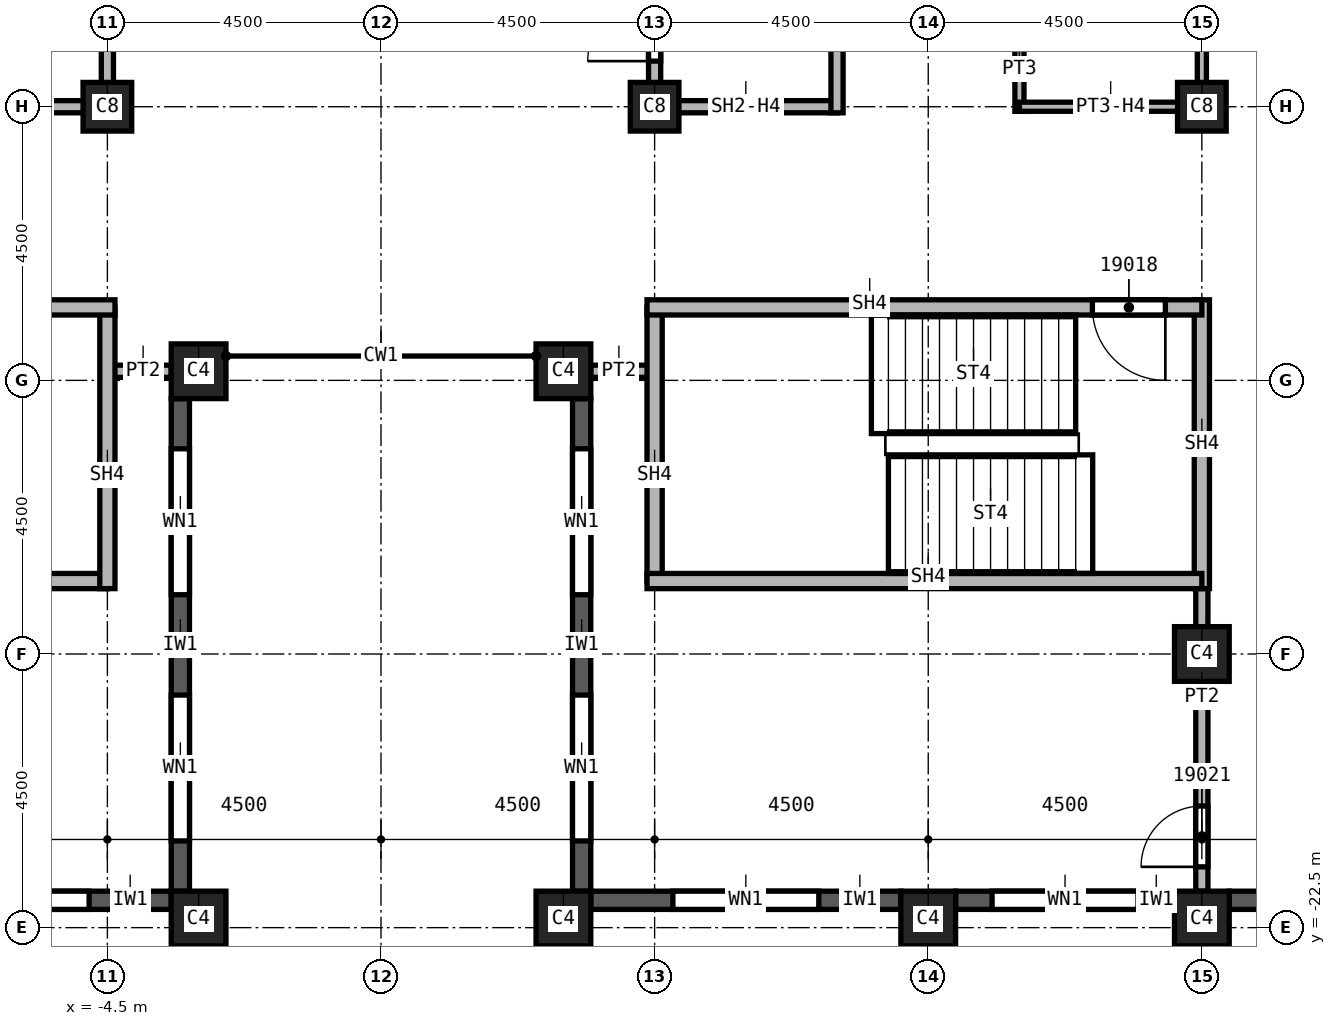
"""IFC4 building model, lengths in metres.
Left out: names, types, materials, properties, quantities, classifications, styles, units other than length and angle.
Written with IfcOpenShell. Run it as: python <this file> out.ifc"""

import sys

from ifc_helpers import new_model, si_unit, direction, frame, frame_2d, origin, origin_2d, place, context, subcontext, project, spatial, rectangle, extrude, element, fill, save


model = new_model("IFC4")
c1 = context("Model", 3, precision=1e-05, world=origin(), true_north=direction((0.0, 1.0)))
c2 = subcontext(c1, "Body", "Model", "MODEL_VIEW")
j1 = project(units=[si_unit("LENGTHUNIT", "METRE"), si_unit("PLANEANGLEUNIT", "RADIAN")], contexts=[c1])
p1 = place(None, origin())
s1 = spatial("IfcSite", under=j1, at=p1, CompositionType="ELEMENT")
p2 = place(p1, origin())
s2 = spatial("IfcBuilding", under=s1, at=p2, CompositionType="ELEMENT")
p3 = place(p2, frame((0.0, 0.0, 278.0)))
s3 = spatial("IfcBuildingStorey", under=s2, at=p3, CompositionType="ELEMENT", Elevation=278.0)
p4 = place(p3, frame((13.5, -18.0, 0.0), z_axis=(0.0, 0.0, 1.0), x_axis=(1.0, 0.0, 0.0)))
e1 = element("IfcColumn", 1, at=p4, inside=s3, PredefinedType="COLUMN", context=c2, shape_type="SweptSolid", body=[
    extrude(rectangle(XDim=0.9, YDim=0.9, at=origin_2d()), origin(), (0.0, 0.0, 1.0), 3.72),
])
for number, where, z_axis, x_axis in (
    (2, (4.5, -9.0, 0.0), (0.0, 0.0, 1.0), (1.0, 0.0, 0.0)),
    (3, (13.5, -9.0, 0.0), (0.0, 0.0, 1.0), (1.0, 0.0, 0.0)),
    (4, (-4.5, -9.0, 0.0), (0.0, 0.0, 1.0), (1.0, 0.0, 0.0)),
):
    element("IfcColumn", number, at=place(p3, frame(where, z_axis=z_axis, x_axis=x_axis)), inside=s3, PredefinedType="COLUMN", context=c2, shape_type="SweptSolid", body=[
        extrude(rectangle(XDim=0.8, YDim=0.8, at=origin_2d()), origin(), (0.0, 0.0, 1.0), 3.72),
    ])
for number, where, z_axis, x_axis in (
    (5, (3.0, -22.35, 0.0), (0.0, 0.0, 1.0), (1.0, 0.0, 0.0)),
    (6, (9.0, -22.35, 0.0), (0.0, 0.0, 1.0), (1.0, 0.0, 0.0)),
    (7, (13.5, -22.35, 0.0), (0.0, 0.0, 1.0), (1.0, 0.0, 0.0)),
    (8, (-3.0, -22.35, 0.0), (0.0, 0.0, 1.0), (1.0, 0.0, 0.0)),
    (9, (3.0, -13.35, 0.0), (0.0, 0.0, 1.0), (1.0, 0.0, 0.0)),
    (10, (-3.0, -13.35, 0.0), (0.0, 0.0, 1.0), (1.0, 0.0, 0.0)),
):
    element("IfcColumn", number, at=place(p3, frame(where, z_axis=z_axis, x_axis=x_axis)), inside=s3, PredefinedType="COLUMN", context=c2, shape_type="SweptSolid", body=[
        extrude(rectangle(XDim=0.9, YDim=0.9, at=origin_2d()), origin(), (0.0, 0.0, 1.0), 3.72),
    ])
p5 = place(p3, frame((-8.55, -22.05, 0.0), z_axis=(0.0, 0.0, 1.0), x_axis=(1.0, 0.0, 0.0)))
e11 = element("IfcWall", 11, at=p5, inside=s3, PredefinedType="SOLIDWALL", context=c2, shape_type="SweptSolid", body=[
    extrude(rectangle(XDim=5.1, YDim=0.3, at=frame_2d((2.55, 0.0))), origin(), (0.0, 0.0, 1.0), 3.12),
])
p6 = place(p5, frame((1.35, 0.0, 0.8)))
e12 = element("IfcOpeningElement", 12, at=p6, cuts=e11, PredefinedType="OPENING", context=c2, shape_type="SweptSolid", body=[
    extrude(rectangle(XDim=2.4, YDim=1.95, at=frame_2d((1.2, 0.975))), frame((0.0, 0.15, 0.0), z_axis=(0.0, -1.0, 0.0), x_axis=(1.0, 0.0, 0.0)), (0.0, 0.0, 1.0), 0.3),
])
p7 = place(p3, frame((-3.3, -21.9, 0.0), z_axis=(0.0, 0.0, 1.0), x_axis=(0.0, 1.0, 0.0)))
e13 = element("IfcWall", 13, at=p7, inside=s3, PredefinedType="SOLIDWALL", context=c2, shape_type="SweptSolid", body=[
    extrude(rectangle(XDim=8.1, YDim=0.3, at=frame_2d((4.05, 0.0))), origin(), (0.0, 0.0, 1.0), 3.12),
])
p8 = place(p7, frame((0.825, 0.0, 0.8)))
e14 = element("IfcOpeningElement", 14, at=p8, cuts=e13, PredefinedType="OPENING", context=c2, shape_type="SweptSolid", body=[
    extrude(rectangle(XDim=2.4, YDim=1.95, at=frame_2d((1.2, 0.975))), frame((0.0, 0.15, 0.0), z_axis=(0.0, -1.0, 0.0), x_axis=(1.0, 0.0, 0.0)), (0.0, 0.0, 1.0), 0.3),
])
p9 = place(p7, frame((4.875, 0.0, 0.8)))
e15 = element("IfcOpeningElement", 15, at=p9, cuts=e13, PredefinedType="OPENING", context=c2, shape_type="SweptSolid", body=[
    extrude(rectangle(XDim=2.4, YDim=1.95, at=frame_2d((1.2, 0.975))), frame((0.0, 0.15, 0.0), z_axis=(0.0, -1.0, 0.0), x_axis=(1.0, 0.0, 0.0)), (0.0, 0.0, 1.0), 0.3),
])
p10 = place(p3, frame((3.3, -13.8, 0.0), z_axis=(0.0, 0.0, 1.0), x_axis=(0.0, -1.0, 0.0)))
e16 = element("IfcWall", 16, at=p10, inside=s3, PredefinedType="SOLIDWALL", context=c2, shape_type="SweptSolid", body=[
    extrude(rectangle(XDim=8.1, YDim=0.3, at=frame_2d((4.05, 0.0))), origin(), (0.0, 0.0, 1.0), 3.12),
])
p11 = place(p10, frame((0.825, 0.0, 0.8)))
e17 = element("IfcOpeningElement", 17, at=p11, cuts=e16, PredefinedType="OPENING", context=c2, shape_type="SweptSolid", body=[
    extrude(rectangle(XDim=2.4, YDim=1.95, at=frame_2d((1.2, 0.975))), frame((0.0, 0.15, 0.0), z_axis=(0.0, -1.0, 0.0), x_axis=(1.0, 0.0, 0.0)), (0.0, 0.0, 1.0), 0.3),
])
p12 = place(p10, frame((4.875, 0.0, 0.8)))
e18 = element("IfcOpeningElement", 18, at=p12, cuts=e16, PredefinedType="OPENING", context=c2, shape_type="SweptSolid", body=[
    extrude(rectangle(XDim=2.4, YDim=1.95, at=frame_2d((1.2, 0.975))), frame((0.0, 0.15, 0.0), z_axis=(0.0, -1.0, 0.0), x_axis=(1.0, 0.0, 0.0)), (0.0, 0.0, 1.0), 0.3),
])
p13 = place(p3, frame((3.45, -22.05, 0.0), z_axis=(0.0, 0.0, 1.0), x_axis=(1.0, 0.0, 0.0)))
e19 = element("IfcWall", 19, at=p13, inside=s3, PredefinedType="SOLIDWALL", context=c2, shape_type="SweptSolid", body=[
    extrude(rectangle(XDim=5.1, YDim=0.3, at=frame_2d((2.55, 0.0))), origin(), (0.0, 0.0, 1.0), 3.12),
])
p14 = place(p13, frame((1.35, 0.0, 0.8)))
e20 = element("IfcOpeningElement", 20, at=p14, cuts=e19, PredefinedType="OPENING", context=c2, shape_type="SweptSolid", body=[
    extrude(rectangle(XDim=2.4, YDim=1.95, at=frame_2d((1.2, 0.975))), frame((0.0, 0.15, 0.0), z_axis=(0.0, -1.0, 0.0), x_axis=(1.0, 0.0, 0.0)), (0.0, 0.0, 1.0), 0.3),
])
p15 = place(p3, frame((9.45, -22.05, 0.0), z_axis=(0.0, 0.0, 1.0), x_axis=(1.0, 0.0, 0.0)))
e21 = element("IfcWall", 21, at=p15, inside=s3, PredefinedType="SOLIDWALL", context=c2, shape_type="SweptSolid", body=[
    extrude(rectangle(XDim=3.6, YDim=0.3, at=frame_2d((1.8, 0.0))), origin(), (0.0, 0.0, 1.0), 3.12),
])
p16 = place(p15, frame((0.6, 0.0, 0.8)))
e22 = element("IfcOpeningElement", 22, at=p16, cuts=e21, PredefinedType="OPENING", context=c2, shape_type="SweptSolid", body=[
    extrude(rectangle(XDim=2.4, YDim=1.95, at=frame_2d((1.2, 0.975))), frame((0.0, 0.15, 0.0), z_axis=(0.0, -1.0, 0.0), x_axis=(1.0, 0.0, 0.0)), (0.0, 0.0, 1.0), 0.3),
])
p17 = place(p3, frame((13.95, -22.05, 0.0), z_axis=(0.0, 0.0, 1.0), x_axis=(1.0, 0.0, 0.0)))
e23 = element("IfcWall", 23, at=p17, inside=s3, PredefinedType="SOLIDWALL", context=c2, shape_type="SweptSolid", body=[
    extrude(rectangle(XDim=3.6, YDim=0.3, at=frame_2d((1.8, 0.0))), origin(), (0.0, 0.0, 1.0), 3.12),
])
p18 = place(p17, frame((0.625, 0.0, 0.8)))
e24 = element("IfcOpeningElement", 24, at=p18, cuts=e23, PredefinedType="OPENING", context=c2, shape_type="SweptSolid", body=[
    extrude(rectangle(XDim=0.6, YDim=1.95, at=frame_2d((0.3, 0.975))), frame((0.0, 0.15, 0.0), z_axis=(0.0, -1.0, 0.0), x_axis=(1.0, 0.0, 0.0)), (0.0, 0.0, 1.0), 0.3),
])
p19 = place(p17, frame((1.825, 0.0, 0.8)))
e25 = element("IfcOpeningElement", 25, at=p19, cuts=e23, PredefinedType="OPENING", context=c2, shape_type="SweptSolid", body=[
    extrude(rectangle(XDim=1.0, YDim=1.95, at=frame_2d((0.5, 0.975))), frame((0.0, 0.15, 0.0), z_axis=(0.0, -1.0, 0.0), x_axis=(1.0, 0.0, 0.0)), (0.0, 0.0, 1.0), 0.3),
])
for number, where, z_axis, x_axis in (
    (26, (-3.45, -13.35, 0.0), (0.0, 0.0, 1.0), (-1.0, 0.0, 0.0)),
    (27, (4.5, -13.35, 0.0), (0.0, 0.0, 1.0), (-1.0, 0.0, 0.0)),
):
    element("IfcWall", number, at=place(p3, frame(where, z_axis=z_axis, x_axis=x_axis)), inside=s3, PredefinedType="PARTITIONING", context=c2, shape_type="SweptSolid", body=[
        extrude(rectangle(XDim=1.05, YDim=0.2, at=frame_2d((0.525, 0.0))), origin(), (0.0, 0.0, 1.0), 3.72),
    ])
p20 = place(p3, frame((13.5, -21.9, 0.0), z_axis=(0.0, 0.0, 1.0), x_axis=(0.0, 1.0, 0.0)))
e28 = element("IfcWall", 28, at=p20, inside=s3, PredefinedType="PARTITIONING", context=c2, shape_type="SweptSolid", body=[
    extrude(rectangle(XDim=5.225, YDim=0.2, at=frame_2d((2.612, 0.0))), origin(), (0.0, 0.0, 1.0), 3.72),
])
p21 = place(p20, frame((0.4, 0.0, 0.0)))
e29 = element("IfcOpeningElement", 29, at=p21, cuts=e28, PredefinedType="OPENING", context=c2, shape_type="SweptSolid", body=[
    extrude(rectangle(XDim=1.0, YDim=2.1, at=frame_2d((0.5, 1.05))), frame((0.0, 0.1, 0.0), z_axis=(0.0, -1.0, 0.0), x_axis=(1.0, 0.0, 0.0)), (0.0, 0.0, 1.0), 0.2),
])
p22 = place(p3, frame((-4.5, -9.0, 0.0), z_axis=(0.0, 0.0, 1.0), x_axis=(-1.0, 0.0, 0.0)))
e30 = element("IfcWall", 30, at=p22, inside=s3, PredefinedType="SOLIDWALL", context=c2, shape_type="SweptSolid", body=[
    extrude(rectangle(XDim=3.0, YDim=0.2, at=frame_2d((1.5, 0.0))), origin(), (0.0, 0.0, 1.0), 3.042),
])
p23 = place(p3, frame((-4.5, 0.0, 0.0), z_axis=(0.0, 0.0, 1.0), x_axis=(0.0, -1.0, 0.0)))
e31 = element("IfcWall", 31, at=p23, inside=s3, PredefinedType="SOLIDWALL", context=c2, shape_type="SweptSolid", body=[
    extrude(rectangle(XDim=9.1, YDim=0.2, at=frame_2d((4.55, 0.0))), origin(), (0.0, 0.0, 1.0), 3.042),
])
p24 = place(p23, frame((1.3, 0.0, 0.0)))
e32 = element("IfcOpeningElement", 32, at=p24, cuts=e31, PredefinedType="OPENING", context=c2, shape_type="SweptSolid", body=[
    extrude(rectangle(XDim=1.1, YDim=2.1, at=frame_2d((0.55, 1.05))), frame((0.0, 0.1, 0.0), z_axis=(0.0, -1.0, 0.0), x_axis=(1.0, 0.0, 0.0)), (0.0, 0.0, 1.0), 0.2),
])
p25 = place(p3, frame((4.5, -9.1, 0.0), z_axis=(0.0, 0.0, 1.0), x_axis=(0.0, 1.0, 0.0)))
e33 = element("IfcWall", 33, at=p25, inside=s3, PredefinedType="SOLIDWALL", context=c2, shape_type="SweptSolid", body=[
    extrude(rectangle(XDim=3.1, YDim=0.2, at=frame_2d((1.55, 0.0))), origin(), (0.0, 0.0, 1.0), 3.042),
])
p26 = place(p25, frame((0.85, 0.0, 0.0)))
e34 = element("IfcOpeningElement", 34, at=p26, cuts=e33, PredefinedType="OPENING", context=c2, shape_type="SweptSolid", body=[
    extrude(rectangle(XDim=1.1, YDim=2.1, at=frame_2d((0.55, 1.05))), frame((0.0, 0.1, 0.0), z_axis=(0.0, -1.0, 0.0), x_axis=(1.0, 0.0, 0.0)), (0.0, 0.0, 1.0), 0.2),
])
p27 = place(p3, frame((7.5, -9.0, 0.0), z_axis=(0.0, 0.0, 1.0), x_axis=(-1.0, 0.0, 0.0)))
e35 = element("IfcWall", 35, at=p27, inside=s3, PredefinedType="SOLIDWALL", context=c2, shape_type="SweptSolid", body=[
    extrude(rectangle(XDim=3.0, YDim=0.2, at=frame_2d((1.5, 0.0))), origin(), (0.0, 0.0, 1.0), 3.042),
])
p28 = place(p3, frame((7.5, -6.0, 0.0), z_axis=(0.0, 0.0, 1.0), x_axis=(0.0, -1.0, 0.0)))
e36 = element("IfcWall", 36, at=p28, inside=s3, PredefinedType="SOLIDWALL", context=c2, shape_type="SweptSolid", body=[
    extrude(rectangle(XDim=3.1, YDim=0.2, at=frame_2d((1.55, 0.0))), origin(), (0.0, 0.0, 1.0), 3.72),
])
p29 = place(p3, frame((-4.5, -16.8, 0.0), z_axis=(0.0, 0.0, 1.0), x_axis=(-1.0, 0.0, 0.0)))
e37 = element("IfcWall", 37, at=p29, inside=s3, PredefinedType="SOLIDWALL", context=c2, shape_type="SweptSolid", body=[
    extrude(rectangle(XDim=9.0, YDim=0.25, at=frame_2d((4.5, 0.0))), origin(), (0.0, 0.0, 1.0), 3.72),
])
p30 = place(p3, frame((-4.5, -12.3, 0.0), z_axis=(0.0, 0.0, 1.0), x_axis=(0.0, -1.0, 0.0)))
e38 = element("IfcWall", 38, at=p30, inside=s3, PredefinedType="SOLIDWALL", context=c2, shape_type="SweptSolid", body=[
    extrude(rectangle(XDim=4.625, YDim=0.25, at=frame_2d((2.312, 0.0))), origin(), (0.0, 0.0, 1.0), 3.72),
])
p31 = place(p3, frame((-4.375, -12.3, 0.0), z_axis=(0.0, 0.0, 1.0), x_axis=(-1.0, 0.0, 0.0)))
e39 = element("IfcWall", 39, at=p31, inside=s3, PredefinedType="SOLIDWALL", context=c2, shape_type="SweptSolid", body=[
    extrude(rectangle(XDim=9.125, YDim=0.25, at=frame_2d((4.562, 0.0))), origin(), (0.0, 0.0, 1.0), 3.72),
])
p32 = place(p31, frame((7.2, 0.0, 0.0)))
e40 = element("IfcOpeningElement", 40, at=p32, cuts=e39, PredefinedType="OPENING", context=c2, shape_type="SweptSolid", body=[
    extrude(rectangle(XDim=1.2, YDim=2.1, at=frame_2d((0.6, 1.05))), frame((0.0, 0.125, 0.0), z_axis=(0.0, -1.0, 0.0), x_axis=(1.0, 0.0, 0.0)), (0.0, 0.0, 1.0), 0.25),
])
p33 = place(p3, frame((4.5, -16.8, 0.0), z_axis=(0.0, 0.0, 1.0), x_axis=(0.0, 1.0, 0.0)))
e41 = element("IfcWall", 41, at=p33, inside=s3, PredefinedType="SOLIDWALL", context=c2, shape_type="SweptSolid", body=[
    extrude(rectangle(XDim=4.5, YDim=0.25, at=frame_2d((2.25, 0.0))), origin(), (0.0, 0.0, 1.0), 3.72),
])
p34 = place(p3, frame((13.5, -16.925, 0.0), z_axis=(0.0, 0.0, 1.0), x_axis=(0.0, 1.0, 0.0)))
e42 = element("IfcWall", 42, at=p34, inside=s3, PredefinedType="SOLIDWALL", context=c2, shape_type="SweptSolid", body=[
    extrude(rectangle(XDim=4.75, YDim=0.25, at=frame_2d((2.375, 0.0))), origin(), (0.0, 0.0, 1.0), 3.72),
])
p35 = place(p3, frame((13.5, -16.8, 0.0), z_axis=(0.0, 0.0, 1.0), x_axis=(-1.0, 0.0, 0.0)))
e43 = element("IfcWall", 43, at=p35, inside=s3, PredefinedType="SOLIDWALL", context=c2, shape_type="SweptSolid", body=[
    extrude(rectangle(XDim=9.125, YDim=0.25, at=frame_2d((4.562, 0.0))), origin(), (0.0, 0.0, 1.0), 3.72),
])
p36 = place(p3, frame((13.5, -12.3, 0.0), z_axis=(0.0, 0.0, 1.0), x_axis=(-1.0, 0.0, 0.0)))
e44 = element("IfcWall", 44, at=p36, inside=s3, PredefinedType="SOLIDWALL", context=c2, shape_type="SweptSolid", body=[
    extrude(rectangle(XDim=9.125, YDim=0.25, at=frame_2d((4.562, 0.0))), origin(), (0.0, 0.0, 1.0), 3.72),
])
p37 = place(p36, frame((0.6, 0.0, 0.0)))
e45 = element("IfcOpeningElement", 45, at=p37, cuts=e44, PredefinedType="OPENING", context=c2, shape_type="SweptSolid", body=[
    extrude(rectangle(XDim=1.2, YDim=2.1, at=frame_2d((0.6, 1.05))), frame((0.0, 0.125, 0.0), z_axis=(0.0, -1.0, 0.0), x_axis=(1.0, 0.0, 0.0)), (0.0, 0.0, 1.0), 0.25),
])
p38 = place(p3, frame((10.5, -5.925, 0.0), z_axis=(0.0, 0.0, 1.0), x_axis=(0.0, -1.0, 0.0)))
e46 = element("IfcWall", 46, at=p38, inside=s3, PredefinedType="PARTITIONING", context=c2, shape_type="SweptSolid", body=[
    extrude(rectangle(XDim=3.15, YDim=0.15, at=frame_2d((1.575, 0.0))), origin(), (0.0, 0.0, 1.0), 3.72),
])
p39 = place(p38, frame((0.25, 0.0, 0.0)))
e47 = element("IfcOpeningElement", 47, at=p39, cuts=e46, PredefinedType="OPENING", context=c2, shape_type="SweptSolid", body=[
    extrude(rectangle(XDim=0.9, YDim=2.1, at=frame_2d((0.45, 1.05))), frame((0.0, 0.075, 0.0), z_axis=(0.0, -1.0, 0.0), x_axis=(1.0, 0.0, 0.0)), (0.0, 0.0, 1.0), 0.15),
])
p40 = place(p3, frame((13.5, -9.0, 0.0), z_axis=(0.0, 0.0, 1.0), x_axis=(-1.0, 0.0, 0.0)))
e48 = element("IfcWall", 48, at=p40, inside=s3, PredefinedType="PARTITIONING", context=c2, shape_type="SweptSolid", body=[
    extrude(rectangle(XDim=3.0, YDim=0.15, at=frame_2d((1.5, 0.0))), origin(), (0.0, 0.0, 1.0), 3.042),
])
p41 = place(p3, frame((13.5, -6.0, 0.0), z_axis=(0.0, 0.0, 1.0), x_axis=(0.0, -1.0, 0.0)))
e49 = element("IfcWall", 49, at=p41, inside=s3, PredefinedType="PARTITIONING", context=c2, shape_type="SweptSolid", body=[
    extrude(rectangle(XDim=3.075, YDim=0.15, at=frame_2d((1.538, 0.0))), origin(), (0.0, 0.0, 1.0), 3.042),
])
p42 = place(p6, origin())
e50 = element("IfcWindow", 50, at=p42, inside=s3, PartitioningType="SINGLE_PANEL", PredefinedType="WINDOW", context=c2, shape_type="SweptSolid", body=[
    extrude(rectangle(XDim=2.4, YDim=1.95, at=frame_2d((1.2, 0.975))), frame((0.0, 0.03, 0.0), z_axis=(0.0, -1.0, 0.0), x_axis=(1.0, 0.0, 0.0)), (0.0, 0.0, 1.0), 0.06),
])
fill(e12, e50)
p43 = place(p8, origin())
e51 = element("IfcWindow", 51, at=p43, inside=s3, PartitioningType="SINGLE_PANEL", PredefinedType="WINDOW", context=c2, shape_type="SweptSolid", body=[
    extrude(rectangle(XDim=2.4, YDim=1.95, at=frame_2d((1.2, 0.975))), frame((0.0, 0.03, 0.0), z_axis=(0.0, -1.0, 0.0), x_axis=(1.0, 0.0, 0.0)), (0.0, 0.0, 1.0), 0.06),
])
fill(e14, e51)
p44 = place(p9, origin())
e52 = element("IfcWindow", 52, at=p44, inside=s3, PartitioningType="SINGLE_PANEL", PredefinedType="WINDOW", context=c2, shape_type="SweptSolid", body=[
    extrude(rectangle(XDim=2.4, YDim=1.95, at=frame_2d((1.2, 0.975))), frame((0.0, 0.03, 0.0), z_axis=(0.0, -1.0, 0.0), x_axis=(1.0, 0.0, 0.0)), (0.0, 0.0, 1.0), 0.06),
])
fill(e15, e52)
p45 = place(p11, origin())
e53 = element("IfcWindow", 53, at=p45, inside=s3, PartitioningType="SINGLE_PANEL", PredefinedType="WINDOW", context=c2, shape_type="SweptSolid", body=[
    extrude(rectangle(XDim=2.4, YDim=1.95, at=frame_2d((1.2, 0.975))), frame((0.0, 0.03, 0.0), z_axis=(0.0, -1.0, 0.0), x_axis=(1.0, 0.0, 0.0)), (0.0, 0.0, 1.0), 0.06),
])
fill(e17, e53)
p46 = place(p12, origin())
e54 = element("IfcWindow", 54, at=p46, inside=s3, PartitioningType="SINGLE_PANEL", PredefinedType="WINDOW", context=c2, shape_type="SweptSolid", body=[
    extrude(rectangle(XDim=2.4, YDim=1.95, at=frame_2d((1.2, 0.975))), frame((0.0, 0.03, 0.0), z_axis=(0.0, -1.0, 0.0), x_axis=(1.0, 0.0, 0.0)), (0.0, 0.0, 1.0), 0.06),
])
fill(e18, e54)
p47 = place(p14, origin())
e55 = element("IfcWindow", 55, at=p47, inside=s3, PartitioningType="SINGLE_PANEL", PredefinedType="WINDOW", context=c2, shape_type="SweptSolid", body=[
    extrude(rectangle(XDim=2.4, YDim=1.95, at=frame_2d((1.2, 0.975))), frame((0.0, 0.03, 0.0), z_axis=(0.0, -1.0, 0.0), x_axis=(1.0, 0.0, 0.0)), (0.0, 0.0, 1.0), 0.06),
])
fill(e20, e55)
p48 = place(p16, origin())
e56 = element("IfcWindow", 56, at=p48, inside=s3, PartitioningType="SINGLE_PANEL", PredefinedType="WINDOW", context=c2, shape_type="SweptSolid", body=[
    extrude(rectangle(XDim=2.4, YDim=1.95, at=frame_2d((1.2, 0.975))), frame((0.0, 0.03, 0.0), z_axis=(0.0, -1.0, 0.0), x_axis=(1.0, 0.0, 0.0)), (0.0, 0.0, 1.0), 0.06),
])
fill(e22, e56)
p49 = place(p26, origin())
e57 = element("IfcDoor", 57, at=p49, inside=s3, OperationType="SINGLE_SWING_LEFT", PredefinedType="DOOR", context=c2, shape_type="SweptSolid", body=[
    extrude(rectangle(XDim=1.1, YDim=2.1, at=frame_2d((0.55, 1.05))), frame((0.0, 0.025, 0.0), z_axis=(0.0, -1.0, 0.0), x_axis=(1.0, 0.0, 0.0)), (0.0, 0.0, 1.0), 0.05),
])
fill(e34, e57)
p50 = place(p37, origin())
e58 = element("IfcDoor", 58, at=p50, inside=s3, OperationType="SINGLE_SWING_LEFT", PredefinedType="DOOR", context=c2, shape_type="SweptSolid", body=[
    extrude(rectangle(XDim=1.2, YDim=2.1, at=frame_2d((0.6, 1.05))), frame((0.0, 0.025, 0.0), z_axis=(0.0, -1.0, 0.0), x_axis=(1.0, 0.0, 0.0)), (0.0, 0.0, 1.0), 0.05),
])
fill(e45, e58)
p51 = place(p21, origin())
e59 = element("IfcDoor", 59, at=p51, inside=s3, OperationType="SINGLE_SWING_RIGHT", PredefinedType="DOOR", context=c2, shape_type="SweptSolid", body=[
    extrude(rectangle(XDim=1.0, YDim=2.1, at=frame_2d((0.5, 1.05))), frame((0.0, 0.025, 0.0), z_axis=(0.0, -1.0, 0.0), x_axis=(1.0, 0.0, 0.0)), (0.0, 0.0, 1.0), 0.05),
])
fill(e29, e59)
save(model, sys.argv[1])
